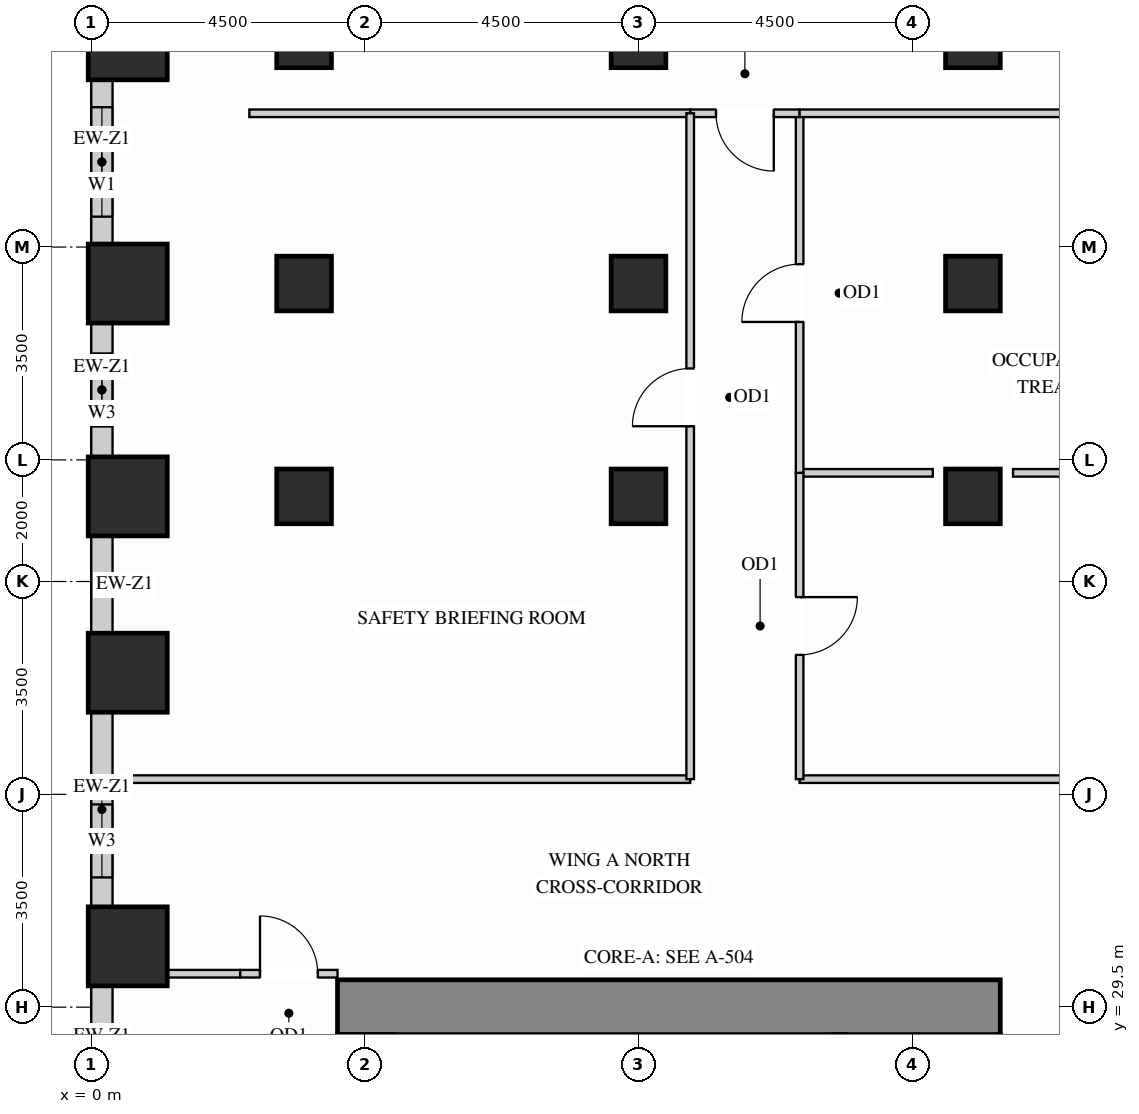
"""IFC4 building model, lengths in metres.
Left out: names, types, materials, properties, quantities, classifications, styles, units other than length and angle.
Written with IfcOpenShell. Run it as: python <this file> out.ifc"""

import sys

from ifc_helpers import new_model, si_unit, direction, frame, frame_2d, origin, origin_2d, place, context, subcontext, project, spatial, rectangle, extrude, source, transform, mapped, element, fill, save


model = new_model("IFC4")
c1 = context("Model", 3, precision=1e-05, world=origin(), true_north=direction((0.0, 1.0)))
c2 = subcontext(c1, "Body", "Model", "MODEL_VIEW")
j1 = project(units=[si_unit("LENGTHUNIT", "METRE"), si_unit("PLANEANGLEUNIT", "RADIAN")], contexts=[c1])
p1 = place(None, origin())
s1 = spatial("IfcSite", under=j1, at=p1, CompositionType="ELEMENT")
p2 = place(p1, origin())
s2 = spatial("IfcBuilding", under=s1, at=p2, CompositionType="ELEMENT")
p3 = place(p2, frame((0.0, 0.0, 54.9)))
s3 = spatial("IfcBuildingStorey", under=s2, at=p3, CompositionType="ELEMENT", Elevation=54.9)
m1 = source(origin(), c2, "Body", "SweptSolid", [
    extrude(rectangle(XDim=0.9, YDim=0.9, at=origin_2d()), origin(), (0.0, 0.0, 1.0), 3.38),
])
for number, where, z_axis, x_axis in (
    (1, (14.5, 37.9, 0.0), (0.0, 0.0, 1.0), (1.0, 0.0, 0.0)),
    (2, (14.5, 41.4, 0.0), (0.0, 0.0, 1.0), (1.0, 0.0, 0.0)),
    (3, (14.5, 45.4, 0.0), (0.0, 0.0, 1.0), (1.0, 0.0, 0.0)),
    (4, (3.5, 37.9, 0.0), (0.0, 0.0, 1.0), (1.0, 0.0, 0.0)),
    (5, (3.5, 41.4, 0.0), (0.0, 0.0, 1.0), (1.0, 0.0, 0.0)),
    (6, (3.5, 45.4, 0.0), (0.0, 0.0, 1.0), (1.0, 0.0, 0.0)),
    (7, (9.0, 37.9, 0.0), (0.0, 0.0, 1.0), (1.0, 0.0, 0.0)),
    (8, (9.0, 41.4, 0.0), (0.0, 0.0, 1.0), (1.0, 0.0, 0.0)),
    (9, (9.0, 45.4, 0.0), (0.0, 0.0, 1.0), (1.0, 0.0, 0.0)),
):
    element("IfcColumn", number, at=place(p3, frame(where, z_axis=z_axis, x_axis=x_axis)), inside=s3, PredefinedType="COLUMN", context=c2, shape_type="MappedRepresentation", body=[
        mapped(m1, transform((0.0, 0.0, 0.0), x_axis=(1.0, 0.0, 0.0), y_axis=(0.0, 1.0, 0.0), z_axis=(0.0, 0.0, 1.0))),
    ])
m2 = source(origin(), c2, "Body", "SweptSolid", [
    extrude(rectangle(XDim=1.3, YDim=1.3, at=origin_2d()), origin(), (0.0, 0.0, 1.0), 3.38),
])
for number, where, z_axis, x_axis in (
    (10, (0.6, 30.5, 0.0), (0.0, 0.0, 1.0), (1.0, 0.0, 0.0)),
    (11, (0.6, 35.0, 0.0), (0.0, 0.0, 1.0), (1.0, 0.0, 0.0)),
    (12, (0.6, 37.9, 0.0), (0.0, 0.0, 1.0), (1.0, 0.0, 0.0)),
    (13, (0.6, 41.4, 0.0), (0.0, 0.0, 1.0), (1.0, 0.0, 0.0)),
    (14, (0.6, 45.4, 0.0), (0.0, 0.0, 1.0), (1.0, 0.0, 0.0)),
):
    element("IfcColumn", number, at=place(p3, frame(where, z_axis=z_axis, x_axis=x_axis)), inside=s3, PredefinedType="COLUMN", context=c2, shape_type="MappedRepresentation", body=[
        mapped(m2, transform((0.0, 0.0, 0.0), x_axis=(1.0, 0.0, 0.0), y_axis=(0.0, 1.0, 0.0), z_axis=(0.0, 0.0, 1.0))),
    ])
m3 = source(origin(), c2, "Body", "SweptSolid", [
    extrude(rectangle(XDim=10.9, YDim=0.9, at=frame_2d((5.45, 0.0))), origin(), (0.0, 0.0, 1.0), 3.38),
])
p4 = place(p3, frame((4.05, 29.5, 0.0), z_axis=(0.0, 0.0, 1.0), x_axis=(1.0, 0.0, 0.0)))
e15 = element("IfcWall", 15, at=p4, inside=s3, PredefinedType="SHEAR", context=c2, shape_type="MappedRepresentation", body=[
    mapped(m3, transform((0.0, 0.0, 0.0), x_axis=(1.0, 0.0, 0.0), y_axis=(0.0, 1.0, 0.0), z_axis=(0.0, 0.0, 1.0))),
])
p5 = place(p3, frame((0.175, 44.752, 0.0), z_axis=(0.0, 0.0, 1.0), x_axis=(0.0, -1.0, 0.0)))
e16 = element("IfcWall", 16, at=p5, inside=s3, PredefinedType="SOLIDWALL", context=c2, shape_type="SweptSolid", body=[
    extrude(rectangle(XDim=2.704, YDim=0.35, at=frame_2d((1.352, 0.0))), origin(), (0.0, 0.0, 1.0), 2.51),
])
p6 = place(p5, frame((0.452, 0.0, 0.78)))
e17 = element("IfcOpeningElement", 17, at=p6, cuts=e16, PredefinedType="OPENING", context=c2, shape_type="SweptSolid", body=[
    extrude(rectangle(XDim=1.8, YDim=1.55, at=frame_2d((0.9, 0.775))), frame((0.0, 0.185, 0.0), z_axis=(0.0, -1.0, 0.0), x_axis=(1.0, 0.0, 0.0)), (0.0, 0.0, 1.0), 0.37),
])
p7 = place(p3, frame((0.175, 40.752, 0.0), z_axis=(0.0, 0.0, 1.0), x_axis=(0.0, -1.0, 0.0)))
e18 = element("IfcWall", 18, at=p7, inside=s3, PredefinedType="SOLIDWALL", context=c2, shape_type="SweptSolid", body=[
    extrude(rectangle(XDim=2.204, YDim=0.35, at=frame_2d((1.102, 0.0))), origin(), (0.0, 0.0, 1.0), 2.51),
])
p8 = place(p7, frame((0.502, 0.0, 0.78)))
e19 = element("IfcOpeningElement", 19, at=p8, cuts=e18, PredefinedType="OPENING", context=c2, shape_type="SweptSolid", body=[
    extrude(rectangle(XDim=1.2, YDim=1.55, at=frame_2d((0.6, 0.775))), frame((0.0, 0.185, 0.0), z_axis=(0.0, -1.0, 0.0), x_axis=(1.0, 0.0, 0.0)), (0.0, 0.0, 1.0), 0.37),
])
m4 = source(origin(), c2, "Body", "SweptSolid", [
    extrude(rectangle(XDim=1.604, YDim=0.35, at=frame_2d((0.802, 0.0))), origin(), (0.0, 0.0, 1.0), 2.51),
])
p9 = place(p3, frame((0.175, 37.252, 0.0), z_axis=(0.0, 0.0, 1.0), x_axis=(0.0, -1.0, 0.0)))
e20 = element("IfcWall", 20, at=p9, inside=s3, PredefinedType="SOLIDWALL", context=c2, shape_type="MappedRepresentation", body=[
    mapped(m4, transform((0.0, 0.0, 0.0), x_axis=(1.0, 0.0, 0.0), y_axis=(0.0, 1.0, 0.0), z_axis=(0.0, 0.0, 1.0))),
])
p10 = place(p3, frame((0.175, 34.352, 0.0), z_axis=(0.0, 0.0, 1.0), x_axis=(0.0, -1.0, 0.0)))
e21 = element("IfcWall", 21, at=p10, inside=s3, PredefinedType="SOLIDWALL", context=c2, shape_type="SweptSolid", body=[
    extrude(rectangle(XDim=3.204, YDim=0.35, at=frame_2d((1.602, 0.0))), origin(), (0.0, 0.0, 1.0), 2.51),
])
p11 = place(p10, frame((1.518, 0.0, 0.78)))
e22 = element("IfcOpeningElement", 22, at=p11, cuts=e21, PredefinedType="OPENING", context=c2, shape_type="SweptSolid", body=[
    extrude(rectangle(XDim=1.2, YDim=1.55, at=frame_2d((0.6, 0.775))), frame((0.0, 0.185, 0.0), z_axis=(0.0, -1.0, 0.0), x_axis=(1.0, 0.0, 0.0)), (0.0, 0.0, 1.0), 0.37),
])
p12 = place(p3, frame((0.175, 29.852, 0.0), z_axis=(0.0, 0.0, 1.0), x_axis=(0.0, -1.0, 0.0)))
e23 = element("IfcWall", 23, at=p12, inside=s3, PredefinedType="SOLIDWALL", context=c2, shape_type="SweptSolid", body=[
    extrude(rectangle(XDim=2.404, YDim=0.35, at=frame_2d((1.202, 0.0))), origin(), (0.0, 0.0, 1.0), 2.51),
])
p13 = place(p12, frame((0.787, 0.0, 0.78)))
e24 = element("IfcOpeningElement", 24, at=p13, cuts=e23, PredefinedType="OPENING", context=c2, shape_type="SweptSolid", body=[
    extrude(rectangle(XDim=1.2, YDim=1.55, at=frame_2d((0.6, 0.775))), frame((0.0, 0.185, 0.0), z_axis=(0.0, -1.0, 0.0), x_axis=(1.0, 0.0, 0.0)), (0.0, 0.0, 1.0), 0.37),
])
m5 = source(origin(), c2, "Body", "SweptSolid", [
    extrude(rectangle(XDim=2.19, YDim=0.125, at=frame_2d((1.095, 0.0))), origin(), (0.0, 0.0, 1.0), 3.365),
])
p14 = place(p3, frame((11.65, 38.287, 0.0), z_axis=(0.0, 0.0, 1.0), x_axis=(1.0, 0.0, 0.0)))
e25 = element("IfcWall", 25, at=p14, inside=s3, PredefinedType="PARTITIONING", context=c2, shape_type="MappedRepresentation", body=[
    mapped(m5, transform((0.0, 0.0, 0.0), x_axis=(1.0, 0.0, 0.0), y_axis=(0.0, 1.0, 0.0), z_axis=(0.0, 0.0, 1.0))),
])
m6 = source(origin(), c2, "Body", "SweptSolid", [
    extrude(rectangle(XDim=3.18, YDim=0.125, at=frame_2d((1.59, 0.0))), origin(), (0.0, 0.0, 1.0), 3.365),
])
p15 = place(p3, frame((15.16, 38.287, 0.0), z_axis=(0.0, 0.0, 1.0), x_axis=(1.0, 0.0, 0.0)))
e26 = element("IfcWall", 26, at=p15, inside=s3, PredefinedType="PARTITIONING", context=c2, shape_type="MappedRepresentation", body=[
    mapped(m6, transform((0.0, 0.0, 0.0), x_axis=(1.0, 0.0, 0.0), y_axis=(0.0, 1.0, 0.0), z_axis=(0.0, 0.0, 1.0))),
])
m7 = source(origin(), c2, "Body", "SweptSolid", [
    extrude(rectangle(XDim=7.498, YDim=0.125, at=frame_2d((3.749, 0.0))), origin(), (0.0, 0.0, 1.0), 2.828),
])
p16 = place(p3, frame((11.65, 33.25, 0.0), z_axis=(0.0, 0.0, 1.0), x_axis=(1.0, 0.0, 0.0)))
e27 = element("IfcWall", 27, at=p16, inside=s3, PredefinedType="PARTITIONING", context=c2, shape_type="MappedRepresentation", body=[
    mapped(m7, transform((0.0, 0.0, 0.0), x_axis=(1.0, 0.0, 0.0), y_axis=(0.0, 1.0, 0.0), z_axis=(0.0, 0.0, 1.0))),
])
m8 = source(origin(), c2, "Body", "SweptSolid", [
    extrude(rectangle(XDim=9.498, YDim=0.125, at=frame_2d((4.749, 0.0))), origin(), (0.0, 0.0, 1.0), 2.828),
])
p17 = place(p3, frame((0.352, 33.25, 0.0), z_axis=(0.0, 0.0, 1.0), x_axis=(1.0, 0.0, 0.0)))
e28 = element("IfcWall", 28, at=p17, inside=s3, PredefinedType="PARTITIONING", context=c2, shape_type="MappedRepresentation", body=[
    mapped(m8, transform((0.0, 0.0, 0.0), x_axis=(1.0, 0.0, 0.0), y_axis=(0.0, 1.0, 0.0), z_axis=(0.0, 0.0, 1.0))),
])
m9 = source(origin(), c2, "Body", "SweptSolid", [
    extrude(rectangle(XDim=1.19, YDim=0.125, at=frame_2d((0.595, 0.0))), origin(), (0.0, 0.0, 1.0), 3.365),
])
p18 = place(p3, frame((1.26, 30.05, 0.0), z_axis=(0.0, 0.0, 1.0), x_axis=(1.0, 0.0, 0.0)))
e29 = element("IfcWall", 29, at=p18, inside=s3, PredefinedType="PARTITIONING", context=c2, shape_type="MappedRepresentation", body=[
    mapped(m9, transform((0.0, 0.0, 0.0), x_axis=(1.0, 0.0, 0.0), y_axis=(0.0, 1.0, 0.0), z_axis=(0.0, 0.0, 1.0))),
])
p19 = place(p3, frame((2.45, 30.05, 0.0), z_axis=(0.0, 0.0, 1.0), x_axis=(1.0, 0.0, 0.0)))
e30 = element("IfcWall", 30, at=p19, inside=s3, PredefinedType="PARTITIONING", context=c2, shape_type="SweptSolid", body=[
    extrude(rectangle(XDim=1.6, YDim=0.125, at=frame_2d((0.8, 0.0))), origin(), (0.0, 0.0, 1.0), 3.365),
])
p20 = place(p19, frame((0.325, 0.0, 0.0)))
e31 = element("IfcOpeningElement", 31, at=p20, cuts=e30, PredefinedType="OPENING", context=c2, shape_type="SweptSolid", body=[
    extrude(rectangle(XDim=0.95, YDim=2.15, at=frame_2d((0.475, 1.075))), frame((0.0, 0.073, 0.0), z_axis=(0.0, -1.0, 0.0), x_axis=(1.0, 0.0, 0.0)), (0.0, 0.0, 1.0), 0.145),
])
p21 = place(p3, frame((11.65, 33.25, 0.0), z_axis=(0.0, 0.0, 1.0), x_axis=(0.0, 1.0, 0.0)))
e32 = element("IfcWall", 32, at=p21, inside=s3, PredefinedType="PARTITIONING", context=c2, shape_type="SweptSolid", body=[
    extrude(rectangle(XDim=5.037, YDim=0.125, at=frame_2d((2.519, 0.0))), origin(), (0.0, 0.0, 1.0), 3.365),
])
p22 = place(p21, frame((2.043, 0.0, 0.0)))
e33 = element("IfcOpeningElement", 33, at=p22, cuts=e32, PredefinedType="OPENING", context=c2, shape_type="SweptSolid", body=[
    extrude(rectangle(XDim=0.95, YDim=2.15, at=frame_2d((0.475, 1.075))), frame((0.0, 0.073, 0.0), z_axis=(0.0, -1.0, 0.0), x_axis=(1.0, 0.0, 0.0)), (0.0, 0.0, 1.0), 0.145),
])
p23 = place(p3, frame((11.65, 38.287, 0.0), z_axis=(0.0, 0.0, 1.0), x_axis=(0.0, 1.0, 0.0)))
e34 = element("IfcWall", 34, at=p23, inside=s3, PredefinedType="PARTITIONING", context=c2, shape_type="SweptSolid", body=[
    extrude(rectangle(XDim=5.913, YDim=0.125, at=frame_2d((2.957, 0.0))), origin(), (0.0, 0.0, 1.0), 3.365),
])
p24 = place(p23, frame((2.481, 0.0, 0.0)))
e35 = element("IfcOpeningElement", 35, at=p24, cuts=e34, PredefinedType="OPENING", context=c2, shape_type="SweptSolid", body=[
    extrude(rectangle(XDim=0.95, YDim=2.15, at=frame_2d((0.475, 1.075))), frame((0.0, 0.073, 0.0), z_axis=(0.0, -1.0, 0.0), x_axis=(1.0, 0.0, 0.0)), (0.0, 0.0, 1.0), 0.145),
])
p25 = place(p3, frame((9.85, 44.2, 0.0), z_axis=(0.0, 0.0, 1.0), x_axis=(1.0, 0.0, 0.0)))
e36 = element("IfcWall", 36, at=p25, inside=s3, PredefinedType="PARTITIONING", context=c2, shape_type="SweptSolid", body=[
    extrude(rectangle(XDim=1.8, YDim=0.125, at=frame_2d((0.9, 0.0))), origin(), (0.0, 0.0, 1.0), 3.365),
])
p26 = place(p25, frame((0.425, 0.0, 0.0)))
e37 = element("IfcOpeningElement", 37, at=p26, cuts=e36, PredefinedType="OPENING", context=c2, shape_type="SweptSolid", body=[
    extrude(rectangle(XDim=0.95, YDim=2.15, at=frame_2d((0.475, 1.075))), frame((0.0, 0.073, 0.0), z_axis=(0.0, -1.0, 0.0), x_axis=(1.0, 0.0, 0.0)), (0.0, 0.0, 1.0), 0.145),
])
m10 = source(origin(), c2, "Body", "SweptSolid", [
    extrude(rectangle(XDim=5.25, YDim=0.125, at=frame_2d((2.625, 0.0))), origin(), (0.0, 0.0, 1.0), 3.365),
])
p27 = place(p3, frame((11.65, 44.2, 0.0), z_axis=(0.0, 0.0, 1.0), x_axis=(1.0, 0.0, 0.0)))
e38 = element("IfcWall", 38, at=p27, inside=s3, PredefinedType="PARTITIONING", context=c2, shape_type="MappedRepresentation", body=[
    mapped(m10, transform((0.0, 0.0, 0.0), x_axis=(1.0, 0.0, 0.0), y_axis=(0.0, 1.0, 0.0), z_axis=(0.0, 0.0, 1.0))),
])
m11 = source(origin(), c2, "Body", "SweptSolid", [
    extrude(rectangle(XDim=7.25, YDim=0.125, at=frame_2d((3.625, 0.0))), origin(), (0.0, 0.0, 1.0), 3.365),
])
p28 = place(p3, frame((2.6, 44.2, 0.0), z_axis=(0.0, 0.0, 1.0), x_axis=(1.0, 0.0, 0.0)))
e39 = element("IfcWall", 39, at=p28, inside=s3, PredefinedType="PARTITIONING", context=c2, shape_type="MappedRepresentation", body=[
    mapped(m11, transform((0.0, 0.0, 0.0), x_axis=(1.0, 0.0, 0.0), y_axis=(0.0, 1.0, 0.0), z_axis=(0.0, 0.0, 1.0))),
])
p29 = place(p3, frame((9.85, 33.25, 0.0), z_axis=(0.0, 0.0, 1.0), x_axis=(0.0, 1.0, 0.0)))
e40 = element("IfcWall", 40, at=p29, inside=s3, PredefinedType="PARTITIONING", context=c2, shape_type="SweptSolid", body=[
    extrude(rectangle(XDim=10.95, YDim=0.125, at=frame_2d((5.475, 0.0))), origin(), (0.0, 0.0, 1.0), 3.365),
])
p30 = place(p29, frame((5.803, 0.0, 0.0)))
e41 = element("IfcOpeningElement", 41, at=p30, cuts=e40, PredefinedType="OPENING", context=c2, shape_type="SweptSolid", body=[
    extrude(rectangle(XDim=0.95, YDim=2.15, at=frame_2d((0.475, 1.075))), frame((0.0, 0.073, 0.0), z_axis=(0.0, -1.0, 0.0), x_axis=(1.0, 0.0, 0.0)), (0.0, 0.0, 1.0), 0.145),
])
m12 = source(origin(), c2, "Body", "SweptSolid", [
    extrude(rectangle(XDim=0.95, YDim=2.15, at=frame_2d((0.475, 1.075))), frame((0.0, 0.025, 0.0), z_axis=(0.0, -1.0, 0.0), x_axis=(1.0, 0.0, 0.0)), (0.0, 0.0, 1.0), 0.05),
])
p31 = place(p22, origin())
e42 = element("IfcDoor", 42, at=p31, inside=s3, OperationType="SINGLE_SWING_RIGHT", PredefinedType="DOOR", context=c2, shape_type="MappedRepresentation", body=[
    mapped(m12, transform((0.0, 0.0, 0.0), x_axis=(1.0, 0.0, 0.0), y_axis=(0.0, 1.0, 0.0), z_axis=(0.0, 0.0, 1.0))),
])
fill(e33, e42)
p32 = place(p24, origin())
e43 = element("IfcDoor", 43, at=p32, inside=s3, OperationType="SINGLE_SWING_LEFT", PredefinedType="DOOR", context=c2, shape_type="MappedRepresentation", body=[
    mapped(m12, transform((0.0, 0.0, 0.0), x_axis=(1.0, 0.0, 0.0), y_axis=(0.0, 1.0, 0.0), z_axis=(0.0, 0.0, 1.0))),
])
fill(e35, e43)
p33 = place(p26, origin())
e44 = element("IfcDoor", 44, at=p33, inside=s3, OperationType="SINGLE_SWING_RIGHT", PredefinedType="DOOR", context=c2, shape_type="MappedRepresentation", body=[
    mapped(m12, transform((0.0, 0.0, 0.0), x_axis=(1.0, 0.0, 0.0), y_axis=(0.0, 1.0, 0.0), z_axis=(0.0, 0.0, 1.0))),
])
fill(e37, e44)
p34 = place(p30, origin())
e45 = element("IfcDoor", 45, at=p34, inside=s3, OperationType="SINGLE_SWING_LEFT", PredefinedType="DOOR", context=c2, shape_type="MappedRepresentation", body=[
    mapped(m12, transform((0.0, 0.0, 0.0), x_axis=(1.0, 0.0, 0.0), y_axis=(0.0, 1.0, 0.0), z_axis=(0.0, 0.0, 1.0))),
])
fill(e41, e45)
p35 = place(p20, origin())
e46 = element("IfcDoor", 46, at=p35, inside=s3, OperationType="SINGLE_SWING_LEFT", PredefinedType="DOOR", context=c2, shape_type="MappedRepresentation", body=[
    mapped(m12, transform((0.0, 0.0, 0.0), x_axis=(1.0, 0.0, 0.0), y_axis=(0.0, 1.0, 0.0), z_axis=(0.0, 0.0, 1.0))),
])
fill(e31, e46)
m13 = source(origin(), c2, "Body", "SweptSolid", [
    extrude(rectangle(XDim=1.8, YDim=1.55, at=frame_2d((0.9, 0.775))), frame((0.0, 0.03, 0.0), z_axis=(0.0, -1.0, 0.0), x_axis=(1.0, 0.0, 0.0)), (0.0, 0.0, 1.0), 0.06),
])
p36 = place(p6, origin())
e47 = element("IfcWindow", 47, at=p36, inside=s3, PartitioningType="SINGLE_PANEL", PredefinedType="WINDOW", context=c2, shape_type="MappedRepresentation", body=[
    mapped(m13, transform((0.0, 0.0, 0.0), x_axis=(1.0, 0.0, 0.0), y_axis=(0.0, 1.0, 0.0), z_axis=(0.0, 0.0, 1.0))),
])
fill(e17, e47)
m14 = source(origin(), c2, "Body", "SweptSolid", [
    extrude(rectangle(XDim=1.2, YDim=1.55, at=frame_2d((0.6, 0.775))), frame((0.0, 0.03, 0.0), z_axis=(0.0, -1.0, 0.0), x_axis=(1.0, 0.0, 0.0)), (0.0, 0.0, 1.0), 0.06),
])
p37 = place(p8, origin())
e48 = element("IfcWindow", 48, at=p37, inside=s3, PartitioningType="SINGLE_PANEL", PredefinedType="WINDOW", context=c2, shape_type="MappedRepresentation", body=[
    mapped(m14, transform((0.0, 0.0, 0.0), x_axis=(1.0, 0.0, 0.0), y_axis=(0.0, 1.0, 0.0), z_axis=(0.0, 0.0, 1.0))),
])
fill(e19, e48)
p38 = place(p11, origin())
e49 = element("IfcWindow", 49, at=p38, inside=s3, PartitioningType="SINGLE_PANEL", PredefinedType="WINDOW", context=c2, shape_type="MappedRepresentation", body=[
    mapped(m14, transform((0.0, 0.0, 0.0), x_axis=(1.0, 0.0, 0.0), y_axis=(0.0, 1.0, 0.0), z_axis=(0.0, 0.0, 1.0))),
])
fill(e22, e49)
p39 = place(p13, origin())
e50 = element("IfcWindow", 50, at=p39, inside=s3, PartitioningType="SINGLE_PANEL", PredefinedType="WINDOW", context=c2, shape_type="MappedRepresentation", body=[
    mapped(m14, transform((0.0, 0.0, 0.0), x_axis=(1.0, 0.0, 0.0), y_axis=(0.0, 1.0, 0.0), z_axis=(0.0, 0.0, 1.0))),
])
fill(e24, e50)
save(model, sys.argv[1])
